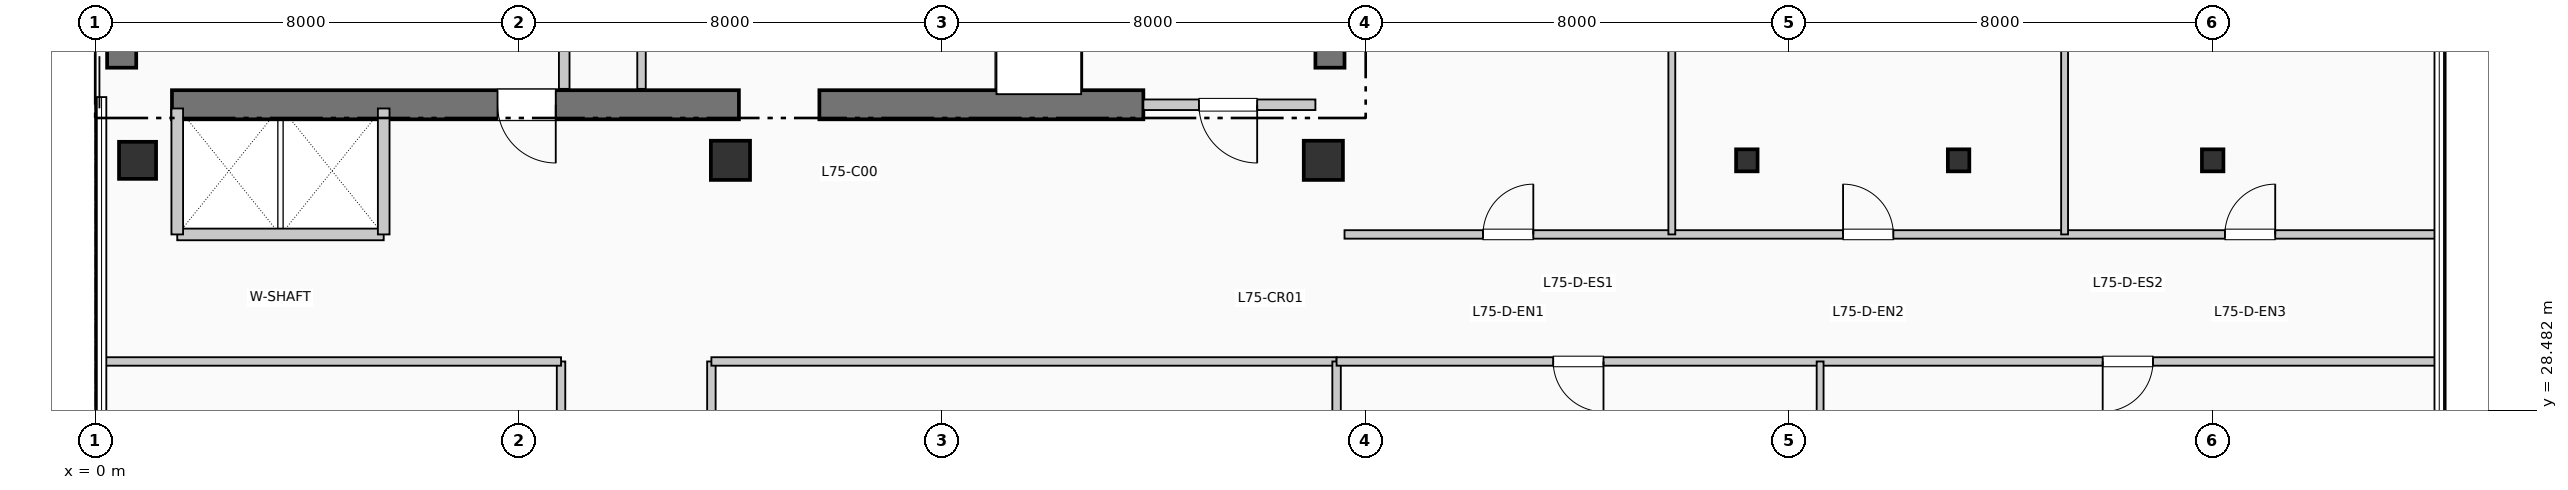
"""IFC4 building model, lengths in metres.
Left out: names, types, materials, properties, quantities, classifications, styles, units other than length and angle.
Written with IfcOpenShell. Run it as: python <this file> out.ifc"""

import sys

from ifc_helpers import new_model, si_unit, direction, frame, frame_2d, origin, origin_2d, place, context, subcontext, project, spatial, rectangle, i_section, extrude, element, fill, save


model = new_model("IFC4")
c1 = context("Model", 3, precision=1e-05, world=origin(), true_north=direction((0.0, 1.0)))
c2 = subcontext(c1, "Body", "Model", "MODEL_VIEW")
j1 = project(units=[si_unit("LENGTHUNIT", "METRE"), si_unit("PLANEANGLEUNIT", "RADIAN")], contexts=[c1])
p1 = place(None, origin())
s1 = spatial("IfcSite", under=j1, at=p1, CompositionType="ELEMENT")
p2 = place(p1, origin())
s2 = spatial("IfcBuilding", under=s1, at=p2, CompositionType="ELEMENT")
p3 = place(p2, frame((0.0, 0.0, 307.89)))
s3 = spatial("IfcBuildingStorey", under=s2, at=p3, CompositionType="ELEMENT", Elevation=307.89)
p4 = place(p3, frame((0.5, 34.95, 0.0), z_axis=(0.0, 0.0, 1.0), x_axis=(0.0, 1.0, 0.0)))
e1 = element("IfcWall", 1, at=p4, inside=s3, PredefinedType="SHEAR", context=c2, shape_type="SweptSolid", body=[
    extrude(rectangle(XDim=7.9, YDim=0.55, at=frame_2d((3.95, 0.0))), origin(), (0.0, 0.0, 1.0), 3.96),
])
p5 = place(p3, frame((23.325, 34.95, 0.0), z_axis=(0.0, 0.0, 1.0), x_axis=(0.0, 1.0, 0.0)))
e2 = element("IfcWall", 2, at=p5, inside=s3, PredefinedType="SHEAR", context=c2, shape_type="SweptSolid", body=[
    extrude(rectangle(XDim=10.64, YDim=0.55, at=frame_2d((5.32, 0.0))), origin(), (0.0, 0.0, 1.0), 3.96),
])
p6 = place(p3, frame((1.45, 34.25, 0.0), z_axis=(0.0, 0.0, 1.0), x_axis=(1.0, 0.0, 0.0)))
e3 = element("IfcWall", 3, at=p6, inside=s3, PredefinedType="SHEAR", context=c2, shape_type="SweptSolid", body=[
    extrude(rectangle(XDim=10.71, YDim=0.55, at=frame_2d((5.355, 0.0))), origin(), (0.0, 0.0, 1.0), 3.96),
])
p7 = place(p6, frame((7.25, 0.0, 0.0), z_axis=(0.0, 0.0, 1.0), x_axis=(-1.0, 0.0, 0.0)))
e4 = element("IfcOpeningElement", 4, at=p7, cuts=e3, PredefinedType="OPENING", context=c2, shape_type="SweptSolid", body=[
    extrude(rectangle(XDim=1.1, YDim=2.15, at=frame_2d((0.55, 1.075))), frame((0.0, 0.285, 0.0), z_axis=(0.0, -1.0, 0.0), x_axis=(1.0, 0.0, 0.0)), (0.0, 0.0, 1.0), 0.57),
])
p8 = place(p3, frame((13.68, 34.25, 0.0), z_axis=(0.0, 0.0, 1.0), x_axis=(1.0, 0.0, 0.0)))
e5 = element("IfcWall", 5, at=p8, inside=s3, PredefinedType="SHEAR", context=c2, shape_type="SweptSolid", body=[
    extrude(rectangle(XDim=6.12, YDim=0.55, at=frame_2d((3.06, 0.0))), origin(), (0.0, 0.0, 1.0), 3.96),
])
p9 = place(p3, frame((0.8, 33.2, 0.0), z_axis=(0.0, 0.0, 1.0), x_axis=(1.0, 0.0, 0.0)))
e6 = element("IfcColumn", 6, at=p9, inside=s3, PredefinedType="COLUMN", context=c2, shape_type="SweptSolid", body=[
    extrude(rectangle(XDim=0.7, YDim=0.7, at=origin_2d()), origin(), (0.0, 0.0, 1.0), 3.96),
])
for number, where, z_axis, x_axis in (
    (7, (12.0, 33.2, 0.0), (0.0, 0.0, 1.0), (1.0, 0.0, 0.0)),
    (8, (23.2, 33.2, 0.0), (0.0, 0.0, 1.0), (1.0, 0.0, 0.0)),
):
    element("IfcColumn", number, at=place(p3, frame(where, z_axis=z_axis, x_axis=x_axis)), inside=s3, PredefinedType="COLUMN", context=c2, shape_type="SweptSolid", body=[
        extrude(rectangle(XDim=0.74, YDim=0.74, at=origin_2d()), origin(), (0.0, 0.0, 1.0), 3.96),
    ])
for number, where, z_axis, x_axis in (
    (9, (31.2, 33.2, 0.0), (0.0, 0.0, 1.0), (1.0, 0.0, 0.0)),
    (10, (35.2, 33.2, 0.0), (0.0, 0.0, 1.0), (1.0, 0.0, 0.0)),
    (11, (40.0, 33.2, 0.0), (0.0, 0.0, 1.0), (1.0, 0.0, 0.0)),
):
    element("IfcColumn", number, at=place(p3, frame(where, z_axis=z_axis, x_axis=x_axis)), inside=s3, PredefinedType="COLUMN", context=c2, shape_type="SweptSolid", body=[
        extrude(i_section(OverallWidth=0.406, OverallDepth=0.416, WebThickness=0.022, FlangeThickness=0.036, at=origin_2d()), origin(), (0.0, 0.0, 1.0), 3.96),
    ])
p10 = place(p3, frame((8.86, 34.55, 0.0), z_axis=(0.0, 0.0, 1.0), x_axis=(0.0, 1.0, 0.0)))
e12 = element("IfcWall", 12, at=p10, inside=s3, PredefinedType="PARTITIONING", context=c2, shape_type="SweptSolid", body=[
    extrude(rectangle(XDim=2.5, YDim=0.2, at=frame_2d((1.25, 0.0))), origin(), (0.0, 0.0, 1.0), 3.74),
])
p11 = place(p3, frame((19.8, 34.25, 0.0), z_axis=(0.0, 0.0, 1.0), x_axis=(1.0, 0.0, 0.0)))
e13 = element("IfcWall", 13, at=p11, inside=s3, PredefinedType="PARTITIONING", context=c2, shape_type="SweptSolid", body=[
    extrude(rectangle(XDim=3.25, YDim=0.2, at=frame_2d((1.625, 0.0))), origin(), (0.0, 0.0, 1.0), 3.74),
])
p12 = place(p11, frame((2.15, 0.0, 0.0), z_axis=(0.0, 0.0, 1.0), x_axis=(-1.0, 0.0, 0.0)))
e14 = element("IfcOpeningElement", 14, at=p12, cuts=e13, PredefinedType="OPENING", context=c2, shape_type="SweptSolid", body=[
    extrude(rectangle(XDim=1.1, YDim=2.15, at=frame_2d((0.55, 1.075))), frame((0.0, 0.11, 0.0), z_axis=(0.0, -1.0, 0.0), x_axis=(1.0, 0.0, 0.0)), (0.0, 0.0, 1.0), 0.22),
])
p13 = place(p3, frame((1.55, 31.8, 0.0), z_axis=(0.0, 0.0, 1.0), x_axis=(1.0, 0.0, 0.0)))
e15 = element("IfcWall", 15, at=p13, inside=s3, PredefinedType="PARTITIONING", context=c2, shape_type="SweptSolid", body=[
    extrude(rectangle(XDim=3.9, YDim=0.22, at=frame_2d((1.95, 0.0))), origin(), (0.0, 0.0, 1.0), 3.74),
])
for number, where, z_axis, x_axis in (
    (16, (1.55, 31.8, 0.0), (0.0, 0.0, 1.0), (0.0, 1.0, 0.0)),
    (17, (5.45, 31.8, 0.0), (0.0, 0.0, 1.0), (0.0, 1.0, 0.0)),
):
    element("IfcWall", number, at=place(p3, frame(where, z_axis=z_axis, x_axis=x_axis)), inside=s3, PredefinedType="PARTITIONING", context=c2, shape_type="SweptSolid", body=[
        extrude(rectangle(XDim=2.38, YDim=0.22, at=frame_2d((1.19, 0.0))), origin(), (0.0, 0.0, 1.0), 3.74),
    ])
p14 = place(p3, frame((10.32, 34.55, 0.0), z_axis=(0.0, 0.0, 1.0), x_axis=(0.0, 1.0, 0.0)))
e18 = element("IfcWall", 18, at=p14, inside=s3, PredefinedType="PARTITIONING", context=c2, shape_type="SweptSolid", body=[
    extrude(rectangle(XDim=2.15, YDim=0.16, at=frame_2d((1.075, 0.0))), origin(), (0.0, 0.0, 1.0), 3.74),
])
p15 = place(p3, frame((8.8, 12.6, 0.0), z_axis=(0.0, 0.0, 1.0), x_axis=(0.0, 1.0, 0.0)))
e19 = element("IfcWall", 19, at=p15, inside=s3, PredefinedType="PARTITIONING", context=c2, shape_type="SweptSolid", body=[
    extrude(rectangle(XDim=16.8, YDim=0.16, at=frame_2d((8.4, 0.0))), origin(), (0.0, 0.0, 1.0), 3.74),
])
p16 = place(p15, frame((4.339, 0.0, 0.0), z_axis=(0.0, 0.0, 1.0), x_axis=(-1.0, 0.0, 0.0)))
e20 = element("IfcOpeningElement", 20, at=p16, cuts=e19, PredefinedType="OPENING", context=c2, shape_type="SweptSolid", body=[
    extrude(rectangle(XDim=0.95, YDim=2.15, at=frame_2d((0.475, 1.075))), frame((0.0, 0.09, 0.0), z_axis=(0.0, -1.0, 0.0), x_axis=(1.0, 0.0, 0.0)), (0.0, 0.0, 1.0), 0.18),
])
p17 = place(p15, frame((12.739, 0.0, 0.0), z_axis=(0.0, 0.0, 1.0), x_axis=(-1.0, 0.0, 0.0)))
e21 = element("IfcOpeningElement", 21, at=p17, cuts=e19, PredefinedType="OPENING", context=c2, shape_type="SweptSolid", body=[
    extrude(rectangle(XDim=0.95, YDim=2.15, at=frame_2d((0.475, 1.075))), frame((0.0, 0.09, 0.0), z_axis=(0.0, -1.0, 0.0), x_axis=(1.0, 0.0, 0.0)), (0.0, 0.0, 1.0), 0.18),
])
p18 = place(p3, frame((11.64, 12.6, 0.0), z_axis=(0.0, 0.0, 1.0), x_axis=(0.0, 1.0, 0.0)))
e22 = element("IfcWall", 22, at=p18, inside=s3, PredefinedType="PARTITIONING", context=c2, shape_type="SweptSolid", body=[
    extrude(rectangle(XDim=16.8, YDim=0.16, at=frame_2d((8.4, 0.0))), origin(), (0.0, 0.0, 1.0), 3.175),
])
p19 = place(p18, frame((3.381, 0.0, 0.0)))
e23 = element("IfcOpeningElement", 23, at=p19, cuts=e22, PredefinedType="OPENING", context=c2, shape_type="SweptSolid", body=[
    extrude(rectangle(XDim=0.95, YDim=2.15, at=frame_2d((0.475, 1.075))), frame((0.0, 0.09, 0.0), z_axis=(0.0, -1.0, 0.0), x_axis=(1.0, 0.0, 0.0)), (0.0, 0.0, 1.0), 0.18),
])
p20 = place(p18, frame((7.593, 0.0, 0.0)))
e24 = element("IfcOpeningElement", 24, at=p20, cuts=e22, PredefinedType="OPENING", context=c2, shape_type="SweptSolid", body=[
    extrude(rectangle(XDim=0.95, YDim=2.15, at=frame_2d((0.475, 1.075))), frame((0.0, 0.09, 0.0), z_axis=(0.0, -1.0, 0.0), x_axis=(1.0, 0.0, 0.0)), (0.0, 0.0, 1.0), 0.18),
])
p21 = place(p18, frame((13.637, 0.0, 0.0)))
e25 = element("IfcOpeningElement", 25, at=p21, cuts=e22, PredefinedType="OPENING", context=c2, shape_type="SweptSolid", body=[
    extrude(rectangle(XDim=0.95, YDim=2.15, at=frame_2d((0.475, 1.075))), frame((0.0, 0.09, 0.0), z_axis=(0.0, -1.0, 0.0), x_axis=(1.0, 0.0, 0.0)), (0.0, 0.0, 1.0), 0.18),
])
p22 = place(p3, frame((0.19, 29.4, 0.0), z_axis=(0.0, 0.0, 1.0), x_axis=(1.0, 0.0, 0.0)))
e26 = element("IfcWall", 26, at=p22, inside=s3, PredefinedType="PARTITIONING", context=c2, shape_type="SweptSolid", body=[
    extrude(rectangle(XDim=8.61, YDim=0.16, at=frame_2d((4.305, 0.0))), origin(), (0.0, 0.0, 1.0), 3.425),
])
p23 = place(p3, frame((11.64, 29.4, 0.0), z_axis=(0.0, 0.0, 1.0), x_axis=(1.0, 0.0, 0.0)))
e27 = element("IfcWall", 27, at=p23, inside=s3, PredefinedType="PARTITIONING", context=c2, shape_type="SweptSolid", body=[
    extrude(rectangle(XDim=11.81, YDim=0.16, at=frame_2d((5.905, 0.0))), origin(), (0.0, 0.0, 1.0), 3.425),
])
p24 = place(p3, frame((23.45, 5.99, 0.0), z_axis=(0.0, 0.0, 1.0), x_axis=(0.0, 1.0, 0.0)))
e28 = element("IfcWall", 28, at=p24, inside=s3, PredefinedType="PARTITIONING", context=c2, shape_type="SweptSolid", body=[
    extrude(rectangle(XDim=23.41, YDim=0.16, at=frame_2d((11.705, 0.0))), origin(), (0.0, 0.0, 1.0), 3.175),
])
p25 = place(p3, frame((23.45, 29.4, 0.0), z_axis=(0.0, 0.0, 1.0), x_axis=(1.0, 0.0, 0.0)))
e29 = element("IfcWall", 29, at=p25, inside=s3, PredefinedType="PARTITIONING", context=c2, shape_type="SweptSolid", body=[
    extrude(rectangle(XDim=20.76, YDim=0.16, at=frame_2d((10.38, 0.0))), origin(), (0.0, 0.0, 1.0), 3.425),
])
p26 = place(p25, frame((5.042, 0.0, 0.0), z_axis=(0.0, 0.0, 1.0), x_axis=(-1.0, 0.0, 0.0)))
e30 = element("IfcOpeningElement", 30, at=p26, cuts=e29, PredefinedType="OPENING", context=c2, shape_type="SweptSolid", body=[
    extrude(rectangle(XDim=0.95, YDim=2.15, at=frame_2d((0.475, 1.075))), frame((0.0, 0.09, 0.0), z_axis=(0.0, -1.0, 0.0), x_axis=(1.0, 0.0, 0.0)), (0.0, 0.0, 1.0), 0.18),
])
p27 = place(p25, frame((15.422, 0.0, 0.0), z_axis=(0.0, 0.0, 1.0), x_axis=(-1.0, 0.0, 0.0)))
e31 = element("IfcOpeningElement", 31, at=p27, cuts=e29, PredefinedType="OPENING", context=c2, shape_type="SweptSolid", body=[
    extrude(rectangle(XDim=0.95, YDim=2.15, at=frame_2d((0.475, 1.075))), frame((0.0, 0.09, 0.0), z_axis=(0.0, -1.0, 0.0), x_axis=(1.0, 0.0, 0.0)), (0.0, 0.0, 1.0), 0.18),
])
p28 = place(p3, frame((23.6, 31.8, 0.0), z_axis=(0.0, 0.0, 1.0), x_axis=(1.0, 0.0, 0.0)))
e32 = element("IfcWall", 32, at=p28, inside=s3, PredefinedType="PARTITIONING", context=c2, shape_type="SweptSolid", body=[
    extrude(rectangle(XDim=20.61, YDim=0.16, at=frame_2d((10.305, 0.0))), origin(), (0.0, 0.0, 1.0), 3.74),
])
p29 = place(p28, frame((2.616, 0.0, 0.0)))
e33 = element("IfcOpeningElement", 33, at=p29, cuts=e32, PredefinedType="OPENING", context=c2, shape_type="SweptSolid", body=[
    extrude(rectangle(XDim=0.95, YDim=2.15, at=frame_2d((0.475, 1.075))), frame((0.0, 0.09, 0.0), z_axis=(0.0, -1.0, 0.0), x_axis=(1.0, 0.0, 0.0)), (0.0, 0.0, 1.0), 0.18),
])
p30 = place(p28, frame((9.418, 0.0, 0.0)))
e34 = element("IfcOpeningElement", 34, at=p30, cuts=e32, PredefinedType="OPENING", context=c2, shape_type="SweptSolid", body=[
    extrude(rectangle(XDim=0.95, YDim=2.15, at=frame_2d((0.475, 1.075))), frame((0.0, 0.09, 0.0), z_axis=(0.0, -1.0, 0.0), x_axis=(1.0, 0.0, 0.0)), (0.0, 0.0, 1.0), 0.18),
])
p31 = place(p28, frame((16.631, 0.0, 0.0)))
e35 = element("IfcOpeningElement", 35, at=p31, cuts=e32, PredefinedType="OPENING", context=c2, shape_type="SweptSolid", body=[
    extrude(rectangle(XDim=0.95, YDim=2.15, at=frame_2d((0.475, 1.075))), frame((0.0, 0.09, 0.0), z_axis=(0.0, -1.0, 0.0), x_axis=(1.0, 0.0, 0.0)), (0.0, 0.0, 1.0), 0.18),
])
p32 = place(p3, frame((32.584, 25.19, 0.0), z_axis=(0.0, 0.0, 1.0), x_axis=(0.0, 1.0, 0.0)))
e36 = element("IfcWall", 36, at=p32, inside=s3, PredefinedType="PARTITIONING", context=c2, shape_type="SweptSolid", body=[
    extrude(rectangle(XDim=4.21, YDim=0.13, at=frame_2d((2.105, 0.0))), origin(), (0.0, 0.0, 1.0), 3.74),
])
for number, where, z_axis, x_axis in (
    (37, (29.783, 31.8, 0.0), (0.0, 0.0, 1.0), (0.0, 1.0, 0.0)),
    (38, (37.203, 31.8, 0.0), (0.0, 0.0, 1.0), (0.0, 1.0, 0.0)),
):
    element("IfcWall", number, at=place(p3, frame(where, z_axis=z_axis, x_axis=x_axis)), inside=s3, PredefinedType="PARTITIONING", context=c2, shape_type="SweptSolid", body=[
        extrude(rectangle(XDim=14.01, YDim=0.13, at=frame_2d((7.005, 0.0))), origin(), (0.0, 0.0, 1.0), 3.74),
    ])
p33 = place(p7, origin())
e39 = element("IfcDoor", 39, at=p33, inside=s3, OperationType="SINGLE_SWING_RIGHT", PredefinedType="DOOR", context=c2, shape_type="SweptSolid", body=[
    extrude(rectangle(XDim=1.1, YDim=2.15, at=frame_2d((0.55, 1.075))), frame((0.0, 0.025, 0.0), z_axis=(0.0, -1.0, 0.0), x_axis=(1.0, 0.0, 0.0)), (0.0, 0.0, 1.0), 0.05),
])
fill(e4, e39)
p34 = place(p12, origin())
e40 = element("IfcDoor", 40, at=p34, inside=s3, OperationType="SINGLE_SWING_RIGHT", PredefinedType="DOOR", context=c2, shape_type="SweptSolid", body=[
    extrude(rectangle(XDim=1.1, YDim=2.15, at=frame_2d((0.55, 1.075))), frame((0.0, 0.025, 0.0), z_axis=(0.0, -1.0, 0.0), x_axis=(1.0, 0.0, 0.0)), (0.0, 0.0, 1.0), 0.05),
])
fill(e14, e40)
p35 = place(p26, origin())
e41 = element("IfcDoor", 41, at=p35, inside=s3, OperationType="SINGLE_SWING_RIGHT", PredefinedType="DOOR", context=c2, shape_type="SweptSolid", body=[
    extrude(rectangle(XDim=0.95, YDim=2.15, at=frame_2d((0.475, 1.075))), frame((0.0, 0.025, 0.0), z_axis=(0.0, -1.0, 0.0), x_axis=(1.0, 0.0, 0.0)), (0.0, 0.0, 1.0), 0.05),
])
fill(e30, e41)
p36 = place(p27, origin())
e42 = element("IfcDoor", 42, at=p36, inside=s3, OperationType="SINGLE_SWING_LEFT", PredefinedType="DOOR", context=c2, shape_type="SweptSolid", body=[
    extrude(rectangle(XDim=0.95, YDim=2.15, at=frame_2d((0.475, 1.075))), frame((0.0, 0.025, 0.0), z_axis=(0.0, -1.0, 0.0), x_axis=(1.0, 0.0, 0.0)), (0.0, 0.0, 1.0), 0.05),
])
fill(e31, e42)
p37 = place(p29, origin())
e43 = element("IfcDoor", 43, at=p37, inside=s3, OperationType="SINGLE_SWING_RIGHT", PredefinedType="DOOR", context=c2, shape_type="SweptSolid", body=[
    extrude(rectangle(XDim=0.95, YDim=2.15, at=frame_2d((0.475, 1.075))), frame((0.0, 0.025, 0.0), z_axis=(0.0, -1.0, 0.0), x_axis=(1.0, 0.0, 0.0)), (0.0, 0.0, 1.0), 0.05),
])
fill(e33, e43)
p38 = place(p30, origin())
e44 = element("IfcDoor", 44, at=p38, inside=s3, OperationType="SINGLE_SWING_LEFT", PredefinedType="DOOR", context=c2, shape_type="SweptSolid", body=[
    extrude(rectangle(XDim=0.95, YDim=2.15, at=frame_2d((0.475, 1.075))), frame((0.0, 0.025, 0.0), z_axis=(0.0, -1.0, 0.0), x_axis=(1.0, 0.0, 0.0)), (0.0, 0.0, 1.0), 0.05),
])
fill(e34, e44)
p39 = place(p31, origin())
e45 = element("IfcDoor", 45, at=p39, inside=s3, OperationType="SINGLE_SWING_RIGHT", PredefinedType="DOOR", context=c2, shape_type="SweptSolid", body=[
    extrude(rectangle(XDim=0.95, YDim=2.15, at=frame_2d((0.475, 1.075))), frame((0.0, 0.025, 0.0), z_axis=(0.0, -1.0, 0.0), x_axis=(1.0, 0.0, 0.0)), (0.0, 0.0, 1.0), 0.05),
])
fill(e35, e45)
save(model, sys.argv[1])
